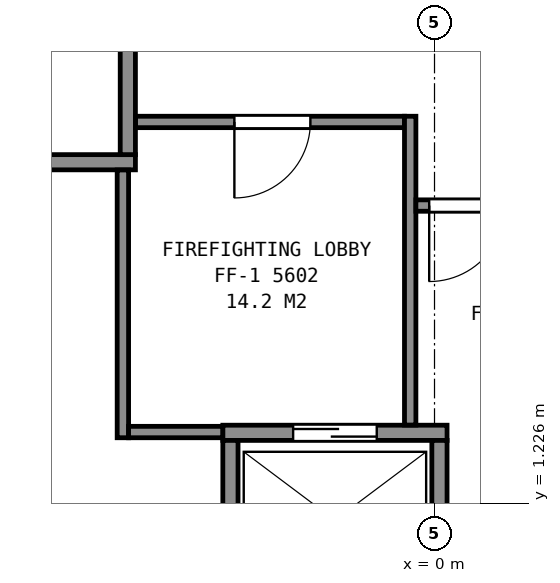
"""IFC4 building model, lengths in metres.
Left out: names, types, materials, properties, quantities, classifications, styles, units other than length and angle.
Written with IfcOpenShell. Run it as: python <this file> out.ifc"""

import sys

from ifc_helpers import new_model, si_unit, direction, frame, frame_2d, origin, place, context, subcontext, project, spatial, rectangle, extrude, element, fill, save


model = new_model("IFC4")
c1 = context("Model", 3, precision=1e-05, world=origin(), true_north=direction((0.0, 1.0)))
c2 = subcontext(c1, "Body", "Model", "MODEL_VIEW")
j1 = project(units=[si_unit("LENGTHUNIT", "METRE"), si_unit("PLANEANGLEUNIT", "RADIAN")], contexts=[c1])
p1 = place(None, origin())
s1 = spatial("IfcSite", under=j1, at=p1, CompositionType="ELEMENT")
p2 = place(p1, origin())
s2 = spatial("IfcBuilding", under=s1, at=p2, CompositionType="ELEMENT")
p3 = place(p2, frame((0.0, 0.0, 224.9)))
s3 = spatial("IfcBuildingStorey", under=s2, at=p3, CompositionType="ELEMENT", Elevation=224.9)
p4 = place(p3, frame((-2.785, 2.15, 0.0), z_axis=(0.0, 0.0, 1.0), x_axis=(1.0, 0.0, 0.0)))
e1 = element("IfcWall", 1, at=p4, inside=s3, PredefinedType="PARTITIONING", context=c2, shape_type="SweptSolid", body=[
    extrude(rectangle(XDim=2.95, YDim=0.2, at=frame_2d((1.475, 0.0))), origin(), (0.0, 0.0, 1.0), 3.7),
])
p5 = place(p4, frame((0.925, 0.0, 0.0)))
e2 = element("IfcOpeningElement", 2, at=p5, cuts=e1, PredefinedType="OPENING", context=c2, shape_type="SweptSolid", body=[
    extrude(rectangle(XDim=1.1, YDim=2.1, at=frame_2d((0.55, 1.05))), frame((0.0, 0.11, 0.0), z_axis=(0.0, -1.0, 0.0), x_axis=(1.0, 0.0, 0.0)), (0.0, 0.0, 1.0), 0.22),
])
p6 = place(p3, frame((-6.285, 5.71, 0.0), z_axis=(0.0, 0.0, 1.0), x_axis=(1.0, 0.0, 0.0)))
e3 = element("IfcWall", 3, at=p6, inside=s3, PredefinedType="PARTITIONING", context=c2, shape_type="SweptSolid", body=[
    extrude(rectangle(XDim=2.35, YDim=0.2, at=frame_2d((1.175, 0.0))), origin(), (0.0, 0.0, 1.0), 3.7),
])
for number, where, z_axis, x_axis in (
    (4, (0.065, 0.1, 0.0), (0.0, 0.0, 1.0), (0.0, 1.0, 0.0)),
    (5, (-2.685, 0.1, 0.0), (0.0, 0.0, 1.0), (0.0, 1.0, 0.0)),
):
    element("IfcWall", number, at=place(p3, frame(where, z_axis=z_axis, x_axis=x_axis)), inside=s3, PredefinedType="PARTITIONING", context=c2, shape_type="SweptSolid", body=[
        extrude(rectangle(XDim=1.95, YDim=0.2, at=frame_2d((0.975, 0.0))), origin(), (0.0, 0.0, 1.0), 3.7),
    ])
p7 = place(p3, frame((-4.035, 5.81, 0.0), z_axis=(0.0, 0.0, 1.0), x_axis=(0.0, 1.0, 0.0)))
e6 = element("IfcWall", 6, at=p7, inside=s3, PredefinedType="PARTITIONING", context=c2, shape_type="SweptSolid", body=[
    extrude(rectangle(XDim=1.75, YDim=0.2, at=frame_2d((0.875, 0.0))), origin(), (0.0, 0.0, 1.0), 3.7),
])
p8 = place(p3, frame((-4.1, 2.085, 0.0), z_axis=(0.0, 0.0, 1.0), x_axis=(0.0, 1.0, 0.0)))
e7 = element("IfcWall", 7, at=p8, inside=s3, PredefinedType="PARTITIONING", context=c2, shape_type="SweptSolid", body=[
    extrude(rectangle(XDim=3.523, YDim=0.15, at=frame_2d((1.761, 0.0))), origin(), (0.0, 0.0, 1.0), 3.45),
])
p9 = place(p3, frame((-4.025, 2.16, 0.0), z_axis=(0.0, 0.0, 1.0), x_axis=(1.0, 0.0, 0.0)))
e8 = element("IfcWall", 8, at=p9, inside=s3, PredefinedType="PARTITIONING", context=c2, shape_type="SweptSolid", body=[
    extrude(rectangle(XDim=1.238, YDim=0.15, at=frame_2d((0.619, 0.0))), origin(), (0.0, 0.0, 1.0), 3.45),
])
p10 = place(p3, frame((-3.933, 6.24, 0.0), z_axis=(0.0, 0.0, 1.0), x_axis=(1.0, 0.0, 0.0)))
e9 = element("IfcWall", 9, at=p10, inside=s3, PredefinedType="PARTITIONING", context=c2, shape_type="SweptSolid", body=[
    extrude(rectangle(XDim=3.538, YDim=0.15, at=frame_2d((1.769, 0.0))), origin(), (0.0, 0.0, 1.0), 3.45),
])
p11 = place(p10, frame((1.3, 0.0, 0.0)))
e10 = element("IfcOpeningElement", 10, at=p11, cuts=e9, PredefinedType="OPENING", context=c2, shape_type="SweptSolid", body=[
    extrude(rectangle(XDim=1.0, YDim=2.1, at=frame_2d((0.5, 1.05))), frame((0.0, 0.085, 0.0), z_axis=(0.0, -1.0, 0.0), x_axis=(1.0, 0.0, 0.0)), (0.0, 0.0, 1.0), 0.17),
])
p12 = place(p3, frame((-0.32, 2.252, 0.0), z_axis=(0.0, 0.0, 1.0), x_axis=(0.0, 1.0, 0.0)))
e11 = element("IfcWall", 11, at=p12, inside=s3, PredefinedType="PARTITIONING", context=c2, shape_type="SweptSolid", body=[
    extrude(rectangle(XDim=4.063, YDim=0.15, at=frame_2d((2.031, 0.0))), origin(), (0.0, 0.0, 1.0), 3.45),
])
p13 = place(p3, frame((-0.245, 5.14, 0.0), z_axis=(0.0, 0.0, 1.0), x_axis=(1.0, 0.0, 0.0)))
e12 = element("IfcWall", 12, at=p13, inside=s3, PredefinedType="PARTITIONING", context=c2, shape_type="SweptSolid", body=[
    extrude(rectangle(XDim=5.11, YDim=0.15, at=frame_2d((2.555, 0.0))), origin(), (0.0, 0.0, 1.0), 3.45),
])
p14 = place(p13, frame((0.175, 0.0, 0.0)))
e13 = element("IfcOpeningElement", 13, at=p14, cuts=e12, PredefinedType="OPENING", context=c2, shape_type="SweptSolid", body=[
    extrude(rectangle(XDim=1.0, YDim=2.1, at=frame_2d((0.5, 1.05))), frame((0.0, 0.085, 0.0), z_axis=(0.0, -1.0, 0.0), x_axis=(1.0, 0.0, 0.0)), (0.0, 0.0, 1.0), 0.17),
])
p15 = place(p3, frame((-4.675, -12.706, 0.0), z_axis=(0.0, 0.0, 1.0), x_axis=(-0.49997440863, 0.866040178465, 0.0)))
e14 = element("IfcWall", 14, at=p15, inside=s3, PredefinedType="PARTITIONING", context=c2, shape_type="SweptSolid", body=[
    extrude(rectangle(XDim=17.335, YDim=0.2, at=frame_2d((8.667, 0.0))), origin(), (0.0, 0.0, 1.0), 2.713),
])
p16 = place(p15, frame((14.185, 0.0, 0.0)))
e15 = element("IfcOpeningElement", 15, at=p16, cuts=e14, PredefinedType="OPENING", context=c2, shape_type="SweptSolid", body=[
    extrude(rectangle(XDim=0.9, YDim=2.1, at=frame_2d((0.45, 1.05))), frame((0.0, 0.11, 0.0), z_axis=(0.0, -1.0, 0.0), x_axis=(1.0, 0.0, 0.0)), (0.0, 0.0, 1.0), 0.22),
])
p17 = place(p15, frame((6.895, 0.0, 0.0)))
e16 = element("IfcOpeningElement", 16, at=p17, cuts=e14, PredefinedType="OPENING", context=c2, shape_type="SweptSolid", body=[
    extrude(rectangle(XDim=0.9, YDim=2.1, at=frame_2d((0.45, 1.05))), frame((0.0, 0.11, 0.0), z_axis=(0.0, -1.0, 0.0), x_axis=(1.0, 0.0, 0.0)), (0.0, 0.0, 1.0), 0.22),
])
p18 = place(p15, frame((1.979, 0.0, 0.0)))
e17 = element("IfcOpeningElement", 17, at=p18, cuts=e14, PredefinedType="OPENING", context=c2, shape_type="SweptSolid", body=[
    extrude(rectangle(XDim=0.9, YDim=2.1, at=frame_2d((0.45, 1.05))), frame((0.0, 0.11, 0.0), z_axis=(0.0, -1.0, 0.0), x_axis=(1.0, 0.0, 0.0)), (0.0, 0.0, 1.0), 0.22),
])
p19 = place(p5, origin())
e18 = element("IfcDoor", 18, at=p19, inside=s3, OperationType="SLIDING_TO_LEFT", PredefinedType="DOOR", context=c2, shape_type="SweptSolid", body=[
    extrude(rectangle(XDim=1.1, YDim=2.1, at=frame_2d((0.55, 1.05))), frame((0.0, 0.025, 0.0), z_axis=(0.0, -1.0, 0.0), x_axis=(1.0, 0.0, 0.0)), (0.0, 0.0, 1.0), 0.05),
])
fill(e2, e18)
p20 = place(p11, origin())
e19 = element("IfcDoor", 19, at=p20, inside=s3, OperationType="SINGLE_SWING_LEFT", PredefinedType="DOOR", context=c2, shape_type="SweptSolid", body=[
    extrude(rectangle(XDim=1.0, YDim=2.1, at=frame_2d((0.5, 1.05))), frame((0.0, 0.025, 0.0), z_axis=(0.0, -1.0, 0.0), x_axis=(1.0, 0.0, 0.0)), (0.0, 0.0, 1.0), 0.05),
])
fill(e10, e19)
p21 = place(p14, origin())
e20 = element("IfcDoor", 20, at=p21, inside=s3, OperationType="SINGLE_SWING_LEFT", PredefinedType="DOOR", context=c2, shape_type="SweptSolid", body=[
    extrude(rectangle(XDim=1.0, YDim=2.1, at=frame_2d((0.5, 1.05))), frame((0.0, 0.025, 0.0), z_axis=(0.0, -1.0, 0.0), x_axis=(1.0, 0.0, 0.0)), (0.0, 0.0, 1.0), 0.05),
])
fill(e13, e20)
save(model, sys.argv[1])
